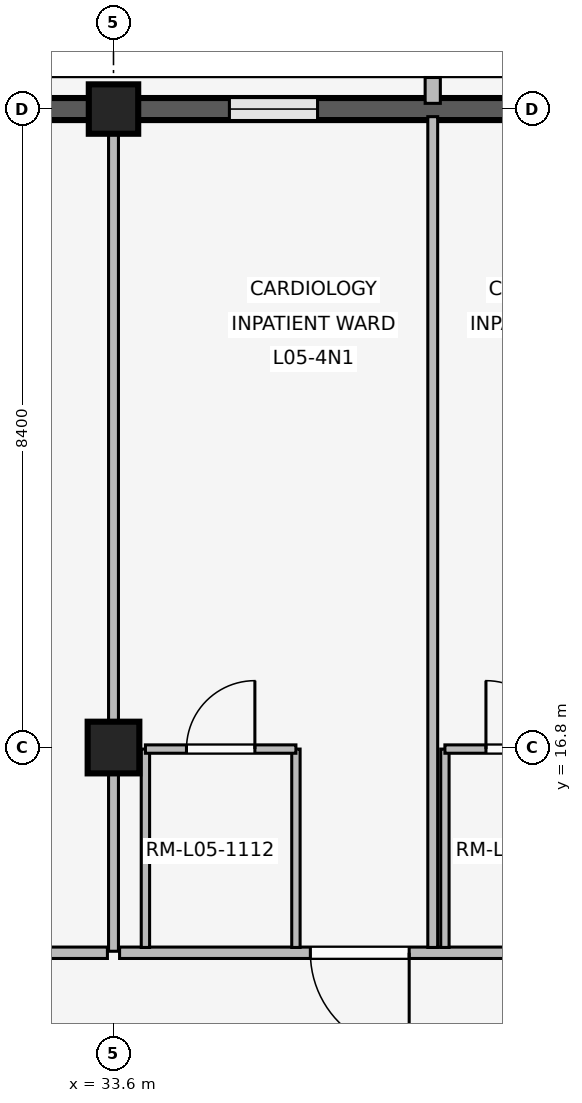
"""IFC4 building model, lengths in metres.
Left out: names, types, materials, properties, quantities, classifications, styles, units other than length and angle.
Written with IfcOpenShell. Run it as: python <this file> out.ifc"""

import sys

from ifc_helpers import new_model, si_unit, direction, frame, frame_2d, origin, origin_2d, place, context, subcontext, project, spatial, rectangle, extrude, element, fill, save


model = new_model("IFC4")
c1 = context("Model", 3, precision=1e-05, world=origin(), true_north=direction((0.0, 1.0)))
c2 = subcontext(c1, "Body", "Model", "MODEL_VIEW")
j1 = project(units=[si_unit("LENGTHUNIT", "METRE"), si_unit("PLANEANGLEUNIT", "RADIAN")], contexts=[c1])
p1 = place(None, origin())
s1 = spatial("IfcSite", under=j1, at=p1, CompositionType="ELEMENT")
p2 = place(p1, origin())
s2 = spatial("IfcBuilding", under=s1, at=p2, CompositionType="ELEMENT")
p3 = place(p2, frame((0.0, 0.0, 20.4)))
s3 = spatial("IfcBuildingStorey", under=s2, at=p3, CompositionType="ELEMENT", Elevation=20.4)
p4 = place(p3, frame((33.6, 16.8, 0.0), z_axis=(0.0, 0.0, 1.0), x_axis=(1.0, 0.0, 0.0)))
e1 = element("IfcColumn", 1, at=p4, inside=s3, PredefinedType="COLUMN", context=c2, shape_type="SweptSolid", body=[
    extrude(rectangle(XDim=0.68, YDim=0.68, at=origin_2d()), origin(), (0.0, 0.0, 1.0), 4.2),
])
p5 = place(p3, frame((33.6, 25.2, 0.0), z_axis=(0.0, 0.0, 1.0), x_axis=(1.0, 0.0, 0.0)))
e2 = element("IfcColumn", 2, at=p5, inside=s3, PredefinedType="COLUMN", context=c2, shape_type="SweptSolid", body=[
    extrude(rectangle(XDim=0.65, YDim=0.65, at=origin_2d()), origin(), (0.0, 0.0, 1.0), 4.2),
])
p6 = place(p3, frame((25.52, 25.2, 0.0), z_axis=(0.0, 0.0, 1.0), x_axis=(1.0, 0.0, 0.0)))
e3 = element("IfcWall", 3, at=p6, inside=s3, PredefinedType="SOLIDWALL", context=c2, shape_type="SweptSolid", body=[
    extrude(rectangle(XDim=7.76, YDim=0.29, at=frame_2d((3.88, 0.0))), origin(), (0.0, 0.0, 1.0), 3.34),
])
p7 = place(p6, frame((1.155, 0.0, 0.85)))
e4 = element("IfcOpeningElement", 4, at=p7, cuts=e3, PredefinedType="OPENING", context=c2, shape_type="SweptSolid", body=[
    extrude(rectangle(XDim=1.26, YDim=1.52, at=frame_2d((0.63, 0.76))), frame((0.0, 0.155, 0.0), z_axis=(0.0, -1.0, 0.0), x_axis=(1.0, 0.0, 0.0)), (0.0, 0.0, 1.0), 0.31),
])
p8 = place(p6, frame((5.345, 0.0, 0.85)))
e5 = element("IfcOpeningElement", 5, at=p8, cuts=e3, PredefinedType="OPENING", context=c2, shape_type="SweptSolid", body=[
    extrude(rectangle(XDim=1.26, YDim=1.52, at=frame_2d((0.63, 0.76))), frame((0.0, 0.155, 0.0), z_axis=(0.0, -1.0, 0.0), x_axis=(1.0, 0.0, 0.0)), (0.0, 0.0, 1.0), 0.31),
])
p9 = place(p3, frame((33.92, 25.2, 0.0), z_axis=(0.0, 0.0, 1.0), x_axis=(1.0, 0.0, 0.0)))
e6 = element("IfcWall", 6, at=p9, inside=s3, PredefinedType="SOLIDWALL", context=c2, shape_type="SweptSolid", body=[
    extrude(rectangle(XDim=7.76, YDim=0.29, at=frame_2d((3.88, 0.0))), origin(), (0.0, 0.0, 1.0), 3.34),
])
p10 = place(p9, frame((1.205, 0.0, 0.85)))
e7 = element("IfcOpeningElement", 7, at=p10, cuts=e6, PredefinedType="OPENING", context=c2, shape_type="SweptSolid", body=[
    extrude(rectangle(XDim=1.16, YDim=1.48, at=frame_2d((0.58, 0.74))), frame((0.0, 0.155, 0.0), z_axis=(0.0, -1.0, 0.0), x_axis=(1.0, 0.0, 0.0)), (0.0, 0.0, 1.0), 0.31),
])
p11 = place(p9, frame((5.395, 0.0, 0.85)))
e8 = element("IfcOpeningElement", 8, at=p11, cuts=e6, PredefinedType="OPENING", context=c2, shape_type="SweptSolid", body=[
    extrude(rectangle(XDim=1.16, YDim=1.48, at=frame_2d((0.58, 0.74))), frame((0.0, 0.155, 0.0), z_axis=(0.0, -1.0, 0.0), x_axis=(1.0, 0.0, 0.0)), (0.0, 0.0, 1.0), 0.31),
])
p12 = place(p3, frame((37.8, 25.275, 0.0), z_axis=(0.0, 0.0, 1.0), x_axis=(0.0, 1.0, 0.0)))
e9 = element("IfcWall", 9, at=p12, inside=s3, PredefinedType="ELEMENTEDWALL", context=c2, shape_type="SweptSolid", body=[
    extrude(rectangle(XDim=0.34, YDim=0.2, at=frame_2d((0.17, 0.0))), origin(), (0.0, 0.0, 1.0), 3.32),
])
p13 = place(p3, frame((33.52, 14.1, 0.0), z_axis=(0.0, 0.0, 1.0), x_axis=(-1.0, 0.0, 0.0)))
e10 = element("IfcWall", 10, at=p13, inside=s3, PredefinedType="PARTITIONING", context=c2, shape_type="SweptSolid", body=[
    extrude(rectangle(XDim=8.24, YDim=0.15, at=frame_2d((4.12, 0.0))), origin(), (0.0, 0.0, 1.0), 3.32),
])
p14 = place(p13, frame((3.495, 0.0, 0.0)))
e11 = element("IfcOpeningElement", 11, at=p14, cuts=e10, PredefinedType="OPENING", context=c2, shape_type="SweptSolid", body=[
    extrude(rectangle(XDim=1.25, YDim=2.2, at=frame_2d((0.625, 1.1))), frame((0.0, 0.085, 0.0), z_axis=(0.0, -1.0, 0.0), x_axis=(1.0, 0.0, 0.0)), (0.0, 0.0, 1.0), 0.17),
])
p15 = place(p3, frame((33.6, 14.12, 0.0), z_axis=(0.0, 0.0, 1.0), x_axis=(0.0, 1.0, 0.0)))
e12 = element("IfcWall", 12, at=p15, inside=s3, PredefinedType="PARTITIONING", context=c2, shape_type="SweptSolid", body=[
    extrude(rectangle(XDim=10.94, YDim=0.13, at=frame_2d((5.47, 0.0))), origin(), (0.0, 0.0, 1.0), 3.32),
])
p16 = place(p3, frame((41.64, 14.1, 0.0), z_axis=(0.0, 0.0, 1.0), x_axis=(-1.0, 0.0, 0.0)))
e13 = element("IfcWall", 13, at=p16, inside=s3, PredefinedType="PARTITIONING", context=c2, shape_type="SweptSolid", body=[
    extrude(rectangle(XDim=7.96, YDim=0.15, at=frame_2d((3.98, 0.0))), origin(), (0.0, 0.0, 1.0), 3.32),
])
p17 = place(p16, frame((0.45, 0.0, 0.0)))
e14 = element("IfcOpeningElement", 14, at=p17, cuts=e13, PredefinedType="OPENING", context=c2, shape_type="SweptSolid", body=[
    extrude(rectangle(XDim=1.3, YDim=2.25, at=frame_2d((0.65, 1.125))), frame((0.0, 0.085, 0.0), z_axis=(0.0, -1.0, 0.0), x_axis=(1.0, 0.0, 0.0)), (0.0, 0.0, 1.0), 0.17),
])
p18 = place(p16, frame((4.15, 0.0, 0.0)))
e15 = element("IfcOpeningElement", 15, at=p18, cuts=e13, PredefinedType="OPENING", context=c2, shape_type="SweptSolid", body=[
    extrude(rectangle(XDim=1.3, YDim=2.25, at=frame_2d((0.65, 1.125))), frame((0.0, 0.085, 0.0), z_axis=(0.0, -1.0, 0.0), x_axis=(1.0, 0.0, 0.0)), (0.0, 0.0, 1.0), 0.17),
])
p19 = place(p3, frame((37.8, 14.17, 0.0), z_axis=(0.0, 0.0, 1.0), x_axis=(0.0, 1.0, 0.0)))
e16 = element("IfcWall", 16, at=p19, inside=s3, PredefinedType="PARTITIONING", context=c2, shape_type="SweptSolid", body=[
    extrude(rectangle(XDim=10.93, YDim=0.13, at=frame_2d((5.465, 0.0))), origin(), (0.0, 0.0, 1.0), 3.32),
])
for number, where, z_axis, x_axis in (
    (17, (34.02, 14.17, 0.0), (0.0, 0.0, 1.0), (0.0, 1.0, 0.0)),
    (18, (36.0, 14.17, 0.0), (0.0, 0.0, 1.0), (0.0, 1.0, 0.0)),
):
    element("IfcWall", number, at=place(p3, frame(where, z_axis=z_axis, x_axis=x_axis)), inside=s3, PredefinedType="PARTITIONING", context=c2, shape_type="SweptSolid", body=[
        extrude(rectangle(XDim=2.61, YDim=0.11, at=frame_2d((1.305, 0.0))), origin(), (0.0, 0.0, 1.0), 3.32),
    ])
p20 = place(p3, frame((34.02, 16.78, 0.0), z_axis=(0.0, 0.0, 1.0), x_axis=(1.0, 0.0, 0.0)))
e19 = element("IfcWall", 19, at=p20, inside=s3, PredefinedType="PARTITIONING", context=c2, shape_type="SweptSolid", body=[
    extrude(rectangle(XDim=1.98, YDim=0.11, at=frame_2d((0.99, 0.0))), origin(), (0.0, 0.0, 1.0), 3.32),
])
p21 = place(p20, frame((0.54, 0.0, 0.0)))
e20 = element("IfcOpeningElement", 20, at=p21, cuts=e19, PredefinedType="OPENING", context=c2, shape_type="SweptSolid", body=[
    extrude(rectangle(XDim=0.9, YDim=2.1, at=frame_2d((0.45, 1.05))), frame((0.0, 0.065, 0.0), z_axis=(0.0, -1.0, 0.0), x_axis=(1.0, 0.0, 0.0)), (0.0, 0.0, 1.0), 0.13),
])
p22 = place(p3, frame((37.96, 14.17, 0.0), z_axis=(0.0, 0.0, 1.0), x_axis=(0.0, 1.0, 0.0)))
e21 = element("IfcWall", 21, at=p22, inside=s3, PredefinedType="PARTITIONING", context=c2, shape_type="SweptSolid", body=[
    extrude(rectangle(XDim=2.61, YDim=0.11, at=frame_2d((1.305, 0.0))), origin(), (0.0, 0.0, 1.0), 3.32),
])
p23 = place(p3, frame((37.96, 16.78, 0.0), z_axis=(0.0, 0.0, 1.0), x_axis=(1.0, 0.0, 0.0)))
e22 = element("IfcWall", 22, at=p23, inside=s3, PredefinedType="PARTITIONING", context=c2, shape_type="SweptSolid", body=[
    extrude(rectangle(XDim=1.98, YDim=0.11, at=frame_2d((0.99, 0.0))), origin(), (0.0, 0.0, 1.0), 3.32),
])
p24 = place(p23, frame((0.54, 0.0, 0.0)))
e23 = element("IfcOpeningElement", 23, at=p24, cuts=e22, PredefinedType="OPENING", context=c2, shape_type="SweptSolid", body=[
    extrude(rectangle(XDim=0.9, YDim=2.1, at=frame_2d((0.45, 1.05))), frame((0.0, 0.065, 0.0), z_axis=(0.0, -1.0, 0.0), x_axis=(1.0, 0.0, 0.0)), (0.0, 0.0, 1.0), 0.13),
])
p25 = place(p10, origin())
e24 = element("IfcWindow", 24, at=p25, inside=s3, PartitioningType="SINGLE_PANEL", PredefinedType="WINDOW", context=c2, shape_type="SweptSolid", body=[
    extrude(rectangle(XDim=1.16, YDim=1.48, at=frame_2d((0.58, 0.74))), frame((0.0, 0.03, 0.0), z_axis=(0.0, -1.0, 0.0), x_axis=(1.0, 0.0, 0.0)), (0.0, 0.0, 1.0), 0.06),
])
fill(e7, e24)
p26 = place(p18, origin())
e25 = element("IfcDoor", 25, at=p26, inside=s3, OperationType="SINGLE_SWING_LEFT", PredefinedType="DOOR", context=c2, shape_type="SweptSolid", body=[
    extrude(rectangle(XDim=1.3, YDim=2.25, at=frame_2d((0.65, 1.125))), frame((0.0, 0.025, 0.0), z_axis=(0.0, -1.0, 0.0), x_axis=(1.0, 0.0, 0.0)), (0.0, 0.0, 1.0), 0.05),
])
fill(e15, e25)
p27 = place(p21, origin())
e26 = element("IfcDoor", 26, at=p27, inside=s3, OperationType="SINGLE_SWING_RIGHT", PredefinedType="DOOR", context=c2, shape_type="SweptSolid", body=[
    extrude(rectangle(XDim=0.9, YDim=2.1, at=frame_2d((0.45, 1.05))), frame((0.0, 0.025, 0.0), z_axis=(0.0, -1.0, 0.0), x_axis=(1.0, 0.0, 0.0)), (0.0, 0.0, 1.0), 0.05),
])
fill(e20, e26)
p28 = place(p24, origin())
e27 = element("IfcDoor", 27, at=p28, inside=s3, OperationType="SINGLE_SWING_LEFT", PredefinedType="DOOR", context=c2, shape_type="SweptSolid", body=[
    extrude(rectangle(XDim=0.9, YDim=2.1, at=frame_2d((0.45, 1.05))), frame((0.0, 0.025, 0.0), z_axis=(0.0, -1.0, 0.0), x_axis=(1.0, 0.0, 0.0)), (0.0, 0.0, 1.0), 0.05),
])
fill(e23, e27)
save(model, sys.argv[1])
